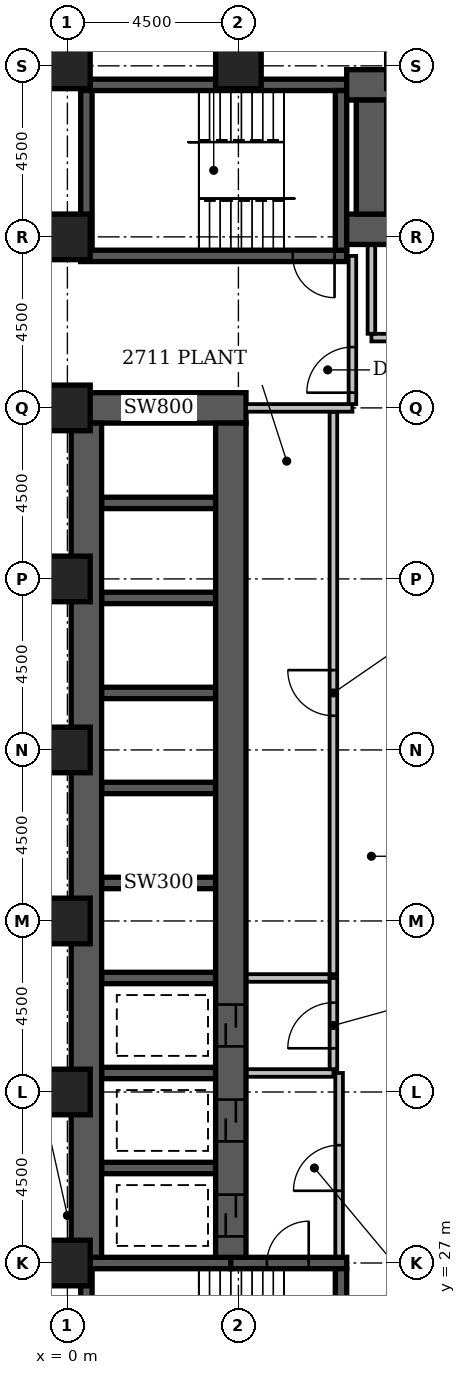
"""IFC4 building model, lengths in metres.
Left out: names, types, materials, properties, quantities, classifications, styles, units other than length and angle.
Written with IfcOpenShell. Run it as: python <this file> out.ifc"""

import sys

from ifc_helpers import new_model, si_unit, direction, frame, frame_2d, origin, origin_2d, place, context, subcontext, project, spatial, rectangle, extrude, element, fill, save


model = new_model("IFC4")
c1 = context("Model", 3, precision=1e-05, world=origin(), true_north=direction((0.0, 1.0)))
c2 = subcontext(c1, "Body", "Model", "MODEL_VIEW")
j1 = project(units=[si_unit("LENGTHUNIT", "METRE"), si_unit("PLANEANGLEUNIT", "RADIAN")], contexts=[c1])
p1 = place(None, origin())
s1 = spatial("IfcSite", under=j1, at=p1, CompositionType="ELEMENT")
p2 = place(p1, origin())
s2 = spatial("IfcBuilding", under=s1, at=p2, CompositionType="ELEMENT")
p3 = place(p2, frame((0.0, 0.0, 108.2)))
s3 = spatial("IfcBuildingStorey", under=s2, at=p3, CompositionType="ELEMENT", Elevation=108.2)
p4 = place(p3, frame((0.1, 49.5, 0.0), z_axis=(0.0, 0.0, 1.0), x_axis=(1.0, 0.0, 0.0)))
e1 = element("IfcWall", 1, at=p4, inside=s3, PredefinedType="SHEAR", context=c2, shape_type="SweptSolid", body=[
    extrude(rectangle(XDim=4.6, YDim=0.8, at=frame_2d((2.3, 0.0))), origin(), (0.0, 0.0, 1.0), 4.9),
])
p5 = place(p3, frame((0.35, 27.0, -0.45), z_axis=(0.0, 0.0, 1.0), x_axis=(1.0, 0.0, 0.0)))
e2 = element("IfcWall", 2, at=p5, inside=s3, PredefinedType="SHEAR", context=c2, shape_type="SweptSolid", body=[
    extrude(rectangle(XDim=3.95, YDim=0.3, at=frame_2d((1.975, 0.0))), origin(), (0.0, 0.0, 1.0), 5.35),
])
p6 = place(p3, frame((0.35, 53.5, -0.45), z_axis=(0.0, 0.0, 1.0), x_axis=(1.0, 0.0, 0.0)))
e3 = element("IfcWall", 3, at=p6, inside=s3, PredefinedType="SHEAR", context=c2, shape_type="SweptSolid", body=[
    extrude(rectangle(XDim=7.0, YDim=0.3, at=frame_2d((3.5, 0.0))), origin(), (0.0, 0.0, 1.0), 5.35),
])
p7 = place(p6, frame((5.58, 0.0, 0.45)))
e4 = element("IfcOpeningElement", 4, at=p7, cuts=e3, PredefinedType="OPENING", context=c2, shape_type="SweptSolid", body=[
    extrude(rectangle(XDim=1.1, YDim=2.1, at=frame_2d((0.55, 1.05))), frame((0.0, 0.162, 0.0), z_axis=(0.0, -1.0, 0.0), x_axis=(1.0, 0.0, 0.0)), (0.0, 0.0, 1.0), 0.324),
])
p8 = place(p3, frame((0.35, 58.0, -0.45), z_axis=(0.0, 0.0, 1.0), x_axis=(1.0, 0.0, 0.0)))
e5 = element("IfcWall", 5, at=p8, inside=s3, PredefinedType="SHEAR", context=c2, shape_type="SweptSolid", body=[
    extrude(rectangle(XDim=7.0, YDim=0.3, at=frame_2d((3.5, 0.0))), origin(), (0.0, 0.0, 1.0), 5.35),
])
p9 = place(p3, frame((0.5, 22.65, -0.45), z_axis=(0.0, 0.0, 1.0), x_axis=(0.0, 1.0, 0.0)))
e6 = element("IfcWall", 6, at=p9, inside=s3, PredefinedType="SHEAR", context=c2, shape_type="SweptSolid", body=[
    extrude(rectangle(XDim=4.2, YDim=0.3, at=frame_2d((2.1, 0.0))), origin(), (0.0, 0.0, 1.0), 5.35),
])
p10 = place(p3, frame((0.5, 27.15, 0.0), z_axis=(0.0, 0.0, 1.0), x_axis=(0.0, 1.0, 0.0)))
e7 = element("IfcWall", 7, at=p10, inside=s3, PredefinedType="SHEAR", context=c2, shape_type="SweptSolid", body=[
    extrude(rectangle(XDim=21.95, YDim=0.8, at=frame_2d((10.975, 0.0))), origin(), (0.0, 0.0, 1.0), 4.9),
])
p11 = place(p3, frame((0.5, 53.65, -0.45), z_axis=(0.0, 0.0, 1.0), x_axis=(0.0, 1.0, 0.0)))
e8 = element("IfcWall", 8, at=p11, inside=s3, PredefinedType="SHEAR", context=c2, shape_type="SweptSolid", body=[
    extrude(rectangle(XDim=4.2, YDim=0.3, at=frame_2d((2.1, 0.0))), origin(), (0.0, 0.0, 1.0), 5.35),
])
for number, where, z_axis, x_axis in (
    (9, (0.9, 29.5, -0.45), (0.0, 0.0, 1.0), (1.0, 0.0, 0.0)),
    (10, (0.9, 32.0, -0.45), (0.0, 0.0, 1.0), (1.0, 0.0, 0.0)),
    (11, (0.9, 34.5, -0.45), (0.0, 0.0, 1.0), (1.0, 0.0, 0.0)),
):
    element("IfcWall", number, at=place(p3, frame(where, z_axis=z_axis, x_axis=x_axis)), inside=s3, PredefinedType="SHEAR", context=c2, shape_type="SweptSolid", body=[
        extrude(rectangle(XDim=3.0, YDim=0.3, at=frame_2d((1.5, 0.0))), origin(), (0.0, 0.0, 1.0), 5.35),
    ])
for number, where, z_axis, x_axis in (
    (12, (0.9, 37.0, 0.0), (0.0, 0.0, 1.0), (1.0, 0.0, 0.0)),
    (13, (0.9, 39.5, 0.0), (0.0, 0.0, 1.0), (1.0, 0.0, 0.0)),
    (14, (0.9, 42.0, 0.0), (0.0, 0.0, 1.0), (1.0, 0.0, 0.0)),
    (15, (0.9, 44.5, 0.0), (0.0, 0.0, 1.0), (1.0, 0.0, 0.0)),
    (16, (0.9, 47.0, 0.0), (0.0, 0.0, 1.0), (1.0, 0.0, 0.0)),
):
    element("IfcWall", number, at=place(p3, frame(where, z_axis=z_axis, x_axis=x_axis)), inside=s3, PredefinedType="SHEAR", context=c2, shape_type="SweptSolid", body=[
        extrude(rectangle(XDim=3.0, YDim=0.3, at=frame_2d((1.5, 0.0))), origin(), (0.0, 0.0, 1.0), 4.9),
    ])
p12 = place(p3, frame((4.3, 27.0, -0.45), z_axis=(0.0, 0.0, 1.0), x_axis=(1.0, 0.0, 0.0)))
e17 = element("IfcWall", 17, at=p12, inside=s3, PredefinedType="SHEAR", context=c2, shape_type="SweptSolid", body=[
    extrude(rectangle(XDim=3.05, YDim=0.3, at=frame_2d((1.525, 0.0))), origin(), (0.0, 0.0, 1.0), 5.35),
])
p13 = place(p12, frame((0.95, 0.0, 0.45)))
e18 = element("IfcOpeningElement", 18, at=p13, cuts=e17, PredefinedType="OPENING", context=c2, shape_type="SweptSolid", body=[
    extrude(rectangle(XDim=1.1, YDim=2.1, at=frame_2d((0.55, 1.05))), frame((0.0, 0.162, 0.0), z_axis=(0.0, -1.0, 0.0), x_axis=(1.0, 0.0, 0.0)), (0.0, 0.0, 1.0), 0.324),
])
p14 = place(p3, frame((4.3, 27.15, 0.0), z_axis=(0.0, 0.0, 1.0), x_axis=(0.0, 1.0, 0.0)))
e19 = element("IfcWall", 19, at=p14, inside=s3, PredefinedType="SHEAR", context=c2, shape_type="SweptSolid", body=[
    extrude(rectangle(XDim=21.95, YDim=0.8, at=frame_2d((10.975, 0.0))), origin(), (0.0, 0.0, 1.0), 4.9),
])
p15 = place(p14, frame((3.05, 0.0, 0.0)))
e20 = element("IfcOpeningElement", 20, at=p15, cuts=e19, PredefinedType="OPENING", context=c2, shape_type="SweptSolid", body=[
    extrude(rectangle(XDim=1.1, YDim=2.1, at=frame_2d((0.55, 1.05))), frame((0.0, 0.412, 0.0), z_axis=(0.0, -1.0, 0.0), x_axis=(1.0, 0.0, 0.0)), (0.0, 0.0, 1.0), 0.824),
])
p16 = place(p14, frame((0.55, 0.0, 0.0)))
e21 = element("IfcOpeningElement", 21, at=p16, cuts=e19, PredefinedType="OPENING", context=c2, shape_type="SweptSolid", body=[
    extrude(rectangle(XDim=1.1, YDim=2.1, at=frame_2d((0.55, 1.05))), frame((0.0, 0.412, 0.0), z_axis=(0.0, -1.0, 0.0), x_axis=(1.0, 0.0, 0.0)), (0.0, 0.0, 1.0), 0.824),
])
p17 = place(p14, frame((5.55, 0.0, 0.0)))
e22 = element("IfcOpeningElement", 22, at=p17, cuts=e19, PredefinedType="OPENING", context=c2, shape_type="SweptSolid", body=[
    extrude(rectangle(XDim=1.1, YDim=2.1, at=frame_2d((0.55, 1.05))), frame((0.0, 0.412, 0.0), z_axis=(0.0, -1.0, 0.0), x_axis=(1.0, 0.0, 0.0)), (0.0, 0.0, 1.0), 0.824),
])
p18 = place(p3, frame((7.2, 22.65, -0.45), z_axis=(0.0, 0.0, 1.0), x_axis=(0.0, 1.0, 0.0)))
e23 = element("IfcWall", 23, at=p18, inside=s3, PredefinedType="SHEAR", context=c2, shape_type="SweptSolid", body=[
    extrude(rectangle(XDim=4.2, YDim=0.3, at=frame_2d((2.1, 0.0))), origin(), (0.0, 0.0, 1.0), 5.35),
])
p19 = place(p18, frame((0.8, 0.0, 0.45)))
e24 = element("IfcOpeningElement", 24, at=p19, cuts=e23, PredefinedType="OPENING", context=c2, shape_type="SweptSolid", body=[
    extrude(rectangle(XDim=1.1, YDim=2.1, at=frame_2d((0.55, 1.05))), frame((0.0, 0.162, 0.0), z_axis=(0.0, -1.0, 0.0), x_axis=(1.0, 0.0, 0.0)), (0.0, 0.0, 1.0), 0.324),
])
p20 = place(p3, frame((7.2, 53.65, -0.45), z_axis=(0.0, 0.0, 1.0), x_axis=(0.0, 1.0, 0.0)))
e25 = element("IfcWall", 25, at=p20, inside=s3, PredefinedType="SHEAR", context=c2, shape_type="SweptSolid", body=[
    extrude(rectangle(XDim=4.2, YDim=0.3, at=frame_2d((2.1, 0.0))), origin(), (0.0, 0.0, 1.0), 5.35),
])
p21 = place(p3, frame((7.35, 54.2, -0.45), z_axis=(0.0, 0.0, 1.0), x_axis=(1.0, 0.0, 0.0)))
e26 = element("IfcWall", 26, at=p21, inside=s3, PredefinedType="SHEAR", context=c2, shape_type="SweptSolid", body=[
    extrude(rectangle(XDim=16.45, YDim=0.8, at=frame_2d((8.225, 0.0))), origin(), (0.0, 0.0, 1.0), 5.35),
])
p22 = place(p21, frame((1.35, 0.0, 0.45)))
e27 = element("IfcOpeningElement", 27, at=p22, cuts=e26, PredefinedType="OPENING", context=c2, shape_type="SweptSolid", body=[
    extrude(rectangle(XDim=1.1, YDim=2.1, at=frame_2d((0.55, 1.05))), frame((0.0, 0.412, 0.0), z_axis=(0.0, -1.0, 0.0), x_axis=(1.0, 0.0, 0.0)), (0.0, 0.0, 1.0), 0.824),
])
p23 = place(p21, frame((3.85, 0.0, 0.45)))
e28 = element("IfcOpeningElement", 28, at=p23, cuts=e26, PredefinedType="OPENING", context=c2, shape_type="SweptSolid", body=[
    extrude(rectangle(XDim=1.1, YDim=2.1, at=frame_2d((0.55, 1.05))), frame((0.0, 0.412, 0.0), z_axis=(0.0, -1.0, 0.0), x_axis=(1.0, 0.0, 0.0)), (0.0, 0.0, 1.0), 0.824),
])
p24 = place(p21, frame((6.35, 0.0, 0.45)))
e29 = element("IfcOpeningElement", 29, at=p24, cuts=e26, PredefinedType="OPENING", context=c2, shape_type="SweptSolid", body=[
    extrude(rectangle(XDim=1.1, YDim=2.1, at=frame_2d((0.55, 1.05))), frame((0.0, 0.412, 0.0), z_axis=(0.0, -1.0, 0.0), x_axis=(1.0, 0.0, 0.0)), (0.0, 0.0, 1.0), 0.824),
])
p25 = place(p21, frame((8.85, 0.0, 0.45)))
e30 = element("IfcOpeningElement", 30, at=p25, cuts=e26, PredefinedType="OPENING", context=c2, shape_type="SweptSolid", body=[
    extrude(rectangle(XDim=1.1, YDim=2.1, at=frame_2d((0.55, 1.05))), frame((0.0, 0.412, 0.0), z_axis=(0.0, -1.0, 0.0), x_axis=(1.0, 0.0, 0.0)), (0.0, 0.0, 1.0), 0.824),
])
p26 = place(p21, frame((11.35, 0.0, 0.45)))
e31 = element("IfcOpeningElement", 31, at=p26, cuts=e26, PredefinedType="OPENING", context=c2, shape_type="SweptSolid", body=[
    extrude(rectangle(XDim=1.1, YDim=2.1, at=frame_2d((0.55, 1.05))), frame((0.0, 0.412, 0.0), z_axis=(0.0, -1.0, 0.0), x_axis=(1.0, 0.0, 0.0)), (0.0, 0.0, 1.0), 0.824),
])
p27 = place(p21, frame((13.85, 0.0, 0.45)))
e32 = element("IfcOpeningElement", 32, at=p27, cuts=e26, PredefinedType="OPENING", context=c2, shape_type="SweptSolid", body=[
    extrude(rectangle(XDim=1.1, YDim=2.1, at=frame_2d((0.55, 1.05))), frame((0.0, 0.412, 0.0), z_axis=(0.0, -1.0, 0.0), x_axis=(1.0, 0.0, 0.0)), (0.0, 0.0, 1.0), 0.824),
])
p28 = place(p3, frame((7.35, 58.0, -0.45), z_axis=(0.0, 0.0, 1.0), x_axis=(1.0, 0.0, 0.0)))
e33 = element("IfcWall", 33, at=p28, inside=s3, PredefinedType="SHEAR", context=c2, shape_type="SweptSolid", body=[
    extrude(rectangle(XDim=16.45, YDim=0.8, at=frame_2d((8.225, 0.0))), origin(), (0.0, 0.0, 1.0), 5.35),
])
p29 = place(p3, frame((8.0, 54.6, -0.45), z_axis=(0.0, 0.0, 1.0), x_axis=(0.0, 1.0, 0.0)))
e34 = element("IfcWall", 34, at=p29, inside=s3, PredefinedType="SHEAR", context=c2, shape_type="SweptSolid", body=[
    extrude(rectangle(XDim=3.0, YDim=0.8, at=frame_2d((1.5, 0.0))), origin(), (0.0, 0.0, 1.0), 5.35),
])
for number, where, z_axis, x_axis in (
    (35, (0.0, 27.0, -0.45), (0.0, 0.0, 1.0), (1.0, 0.0, 0.0)),
    (36, (0.0, 31.5, -0.45), (0.0, 0.0, 1.0), (1.0, 0.0, 0.0)),
    (37, (0.0, 36.0, -0.45), (0.0, 0.0, 1.0), (1.0, 0.0, 0.0)),
    (38, (0.0, 40.5, -0.45), (0.0, 0.0, 1.0), (1.0, 0.0, 0.0)),
    (39, (0.0, 45.0, -0.45), (0.0, 0.0, 1.0), (1.0, 0.0, 0.0)),
    (40, (0.0, 49.5, -0.45), (0.0, 0.0, 1.0), (1.0, 0.0, 0.0)),
    (41, (0.0, 54.0, -0.45), (0.0, 0.0, 1.0), (1.0, 0.0, 0.0)),
    (42, (0.0, 58.5, -0.45), (0.0, 0.0, 1.0), (1.0, 0.0, 0.0)),
    (43, (4.5, 58.5, -0.45), (0.0, 0.0, 1.0), (1.0, 0.0, 0.0)),
):
    element("IfcColumn", number, at=place(p3, frame(where, z_axis=z_axis, x_axis=x_axis)), inside=s3, PredefinedType="COLUMN", context=c2, shape_type="SweptSolid", body=[
        extrude(rectangle(XDim=1.2, YDim=1.2, at=origin_2d()), origin(), (0.0, 0.0, 1.0), 5.35),
    ])
p30 = place(p3, frame((8.0, 51.35, 0.0), z_axis=(0.0, 0.0, 1.0), x_axis=(1.0, 0.0, 0.0)))
e44 = element("IfcWall", 44, at=p30, inside=s3, PredefinedType="PARTITIONING", context=c2, shape_type="SweptSolid", body=[
    extrude(rectangle(XDim=15.0, YDim=0.2, at=frame_2d((7.5, 0.0))), origin(), (0.0, 0.0, 1.0), 4.9),
])
p31 = place(p30, frame((3.4, 0.0, 0.0)))
e45 = element("IfcOpeningElement", 45, at=p31, cuts=e44, PredefinedType="OPENING", context=c2, shape_type="SweptSolid", body=[
    extrude(rectangle(XDim=1.2, YDim=2.1, at=frame_2d((0.6, 1.05))), frame((0.0, 0.112, 0.0), z_axis=(0.0, -1.0, 0.0), x_axis=(1.0, 0.0, 0.0)), (0.0, 0.0, 1.0), 0.224),
])
p32 = place(p30, frame((9.4, 0.0, 0.0)))
e46 = element("IfcOpeningElement", 46, at=p32, cuts=e44, PredefinedType="OPENING", context=c2, shape_type="SweptSolid", body=[
    extrude(rectangle(XDim=1.2, YDim=2.1, at=frame_2d((0.6, 1.05))), frame((0.0, 0.112, 0.0), z_axis=(0.0, -1.0, 0.0), x_axis=(1.0, 0.0, 0.0)), (0.0, 0.0, 1.0), 0.224),
])
p33 = place(p3, frame((8.0, 51.45, 0.0), z_axis=(0.0, 0.0, 1.0), x_axis=(0.0, 1.0, 0.0)))
e47 = element("IfcWall", 47, at=p33, inside=s3, PredefinedType="PARTITIONING", context=c2, shape_type="SweptSolid", body=[
    extrude(rectangle(XDim=2.33, YDim=0.2, at=frame_2d((1.165, 0.0))), origin(), (0.0, 0.0, 1.0), 4.9),
])
p34 = place(p3, frame((4.72, 32.0, 0.0), z_axis=(0.0, 0.0, 1.0), x_axis=(1.0, 0.0, 0.0)))
e48 = element("IfcWall", 48, at=p34, inside=s3, PredefinedType="PARTITIONING", context=c2, shape_type="SweptSolid", body=[
    extrude(rectangle(XDim=2.28, YDim=0.2, at=frame_2d((1.14, 0.0))), origin(), (0.0, 0.0, 1.0), 4.9),
])
p35 = place(p3, frame((7.0, 32.1, 0.0), z_axis=(0.0, 0.0, 1.0), x_axis=(0.0, 1.0, 0.0)))
e49 = element("IfcWall", 49, at=p35, inside=s3, PredefinedType="PARTITIONING", context=c2, shape_type="SweptSolid", body=[
    extrude(rectangle(XDim=2.4, YDim=0.2, at=frame_2d((1.2, 0.0))), origin(), (0.0, 0.0, 1.0), 4.9),
])
p36 = place(p35, frame((0.55, 0.0, 0.0)))
e50 = element("IfcOpeningElement", 50, at=p36, cuts=e49, PredefinedType="OPENING", context=c2, shape_type="SweptSolid", body=[
    extrude(rectangle(XDim=1.2, YDim=2.1, at=frame_2d((0.6, 1.05))), frame((0.0, 0.112, 0.0), z_axis=(0.0, -1.0, 0.0), x_axis=(1.0, 0.0, 0.0)), (0.0, 0.0, 1.0), 0.224),
])
p37 = place(p3, frame((4.72, 34.5, 0.0), z_axis=(0.0, 0.0, 1.0), x_axis=(1.0, 0.0, 0.0)))
e51 = element("IfcWall", 51, at=p37, inside=s3, PredefinedType="PARTITIONING", context=c2, shape_type="SweptSolid", body=[
    extrude(rectangle(XDim=2.18, YDim=0.2, at=frame_2d((1.09, 0.0))), origin(), (0.0, 0.0, 1.0), 4.9),
])
p38 = place(p3, frame((7.15, 27.17, 0.0), z_axis=(0.0, 0.0, 1.0), x_axis=(0.0, 1.0, 0.0)))
e52 = element("IfcWall", 52, at=p38, inside=s3, PredefinedType="PARTITIONING", context=c2, shape_type="SweptSolid", body=[
    extrude(rectangle(XDim=4.83, YDim=0.2, at=frame_2d((2.415, 0.0))), origin(), (0.0, 0.0, 1.0), 4.9),
])
p39 = place(p38, frame((1.73, 0.0, 0.0)))
e53 = element("IfcOpeningElement", 53, at=p39, cuts=e52, PredefinedType="OPENING", context=c2, shape_type="SweptSolid", body=[
    extrude(rectangle(XDim=1.2, YDim=2.1, at=frame_2d((0.6, 1.05))), frame((0.0, 0.112, 0.0), z_axis=(0.0, -1.0, 0.0), x_axis=(1.0, 0.0, 0.0)), (0.0, 0.0, 1.0), 0.224),
])
p40 = place(p3, frame((4.7, 49.5, 0.0), z_axis=(0.0, 0.0, 1.0), x_axis=(1.0, 0.0, 0.0)))
e54 = element("IfcWall", 54, at=p40, inside=s3, PredefinedType="PARTITIONING", context=c2, shape_type="SweptSolid", body=[
    extrude(rectangle(XDim=2.8, YDim=0.2, at=frame_2d((1.4, 0.0))), origin(), (0.0, 0.0, 1.0), 4.9),
])
p41 = place(p3, frame((7.5, 49.6, 0.0), z_axis=(0.0, 0.0, 1.0), x_axis=(0.0, 1.0, 0.0)))
e55 = element("IfcWall", 55, at=p41, inside=s3, PredefinedType="PARTITIONING", context=c2, shape_type="SweptSolid", body=[
    extrude(rectangle(XDim=3.9, YDim=0.2, at=frame_2d((1.95, 0.0))), origin(), (0.0, 0.0, 1.0), 4.9),
])
p42 = place(p41, frame((0.3, 0.0, 0.0)))
e56 = element("IfcOpeningElement", 56, at=p42, cuts=e55, PredefinedType="OPENING", context=c2, shape_type="SweptSolid", body=[
    extrude(rectangle(XDim=1.2, YDim=2.1, at=frame_2d((0.6, 1.05))), frame((0.0, 0.112, 0.0), z_axis=(0.0, -1.0, 0.0), x_axis=(1.0, 0.0, 0.0)), (0.0, 0.0, 1.0), 0.224),
])
p43 = place(p3, frame((7.0, 49.4, 0.0), z_axis=(0.0, 0.0, 1.0), x_axis=(0.0, -1.0, 0.0)))
e57 = element("IfcWall", 57, at=p43, inside=s3, PredefinedType="PARTITIONING", context=c2, shape_type="SweptSolid", body=[
    extrude(rectangle(XDim=14.8, YDim=0.2, at=frame_2d((7.4, 0.0))), origin(), (0.0, 0.0, 1.0), 4.9),
])
p44 = place(p43, frame((6.8, 0.0, 0.0)))
e58 = element("IfcOpeningElement", 58, at=p44, cuts=e57, PredefinedType="OPENING", context=c2, shape_type="SweptSolid", body=[
    extrude(rectangle(XDim=1.2, YDim=2.1, at=frame_2d((0.6, 1.05))), frame((0.0, 0.112, 0.0), z_axis=(0.0, -1.0, 0.0), x_axis=(1.0, 0.0, 0.0)), (0.0, 0.0, 1.0), 0.224),
])
p45 = place(p42, origin())
e59 = element("IfcDoor", 59, at=p45, inside=s3, OperationType="SINGLE_SWING_LEFT", PredefinedType="DOOR", context=c2, shape_type="SweptSolid", body=[
    extrude(rectangle(XDim=1.2, YDim=2.1, at=frame_2d((0.6, 1.05))), frame((0.0, 0.025, 0.0), z_axis=(0.0, -1.0, 0.0), x_axis=(1.0, 0.0, 0.0)), (0.0, 0.0, 1.0), 0.05),
])
fill(e56, e59)
p46 = place(p39, origin())
e60 = element("IfcDoor", 60, at=p46, inside=s3, OperationType="SINGLE_SWING_LEFT", PredefinedType="DOOR", context=c2, shape_type="SweptSolid", body=[
    extrude(rectangle(XDim=1.2, YDim=2.1, at=frame_2d((0.6, 1.05))), frame((0.0, 0.025, 0.0), z_axis=(0.0, -1.0, 0.0), x_axis=(1.0, 0.0, 0.0)), (0.0, 0.0, 1.0), 0.05),
])
fill(e53, e60)
p47 = place(p15, origin())
e61 = element("IfcDoor", 61, at=p47, inside=s3, OperationType="SLIDING_TO_LEFT", PredefinedType="DOOR", context=c2, shape_type="SweptSolid", body=[
    extrude(rectangle(XDim=1.1, YDim=2.1, at=frame_2d((0.55, 1.05))), frame((0.0, 0.025, 0.0), z_axis=(0.0, -1.0, 0.0), x_axis=(1.0, 0.0, 0.0)), (0.0, 0.0, 1.0), 0.05),
])
fill(e20, e61)
p48 = place(p16, origin())
e62 = element("IfcDoor", 62, at=p48, inside=s3, OperationType="SLIDING_TO_LEFT", PredefinedType="DOOR", context=c2, shape_type="SweptSolid", body=[
    extrude(rectangle(XDim=1.1, YDim=2.1, at=frame_2d((0.55, 1.05))), frame((0.0, 0.025, 0.0), z_axis=(0.0, -1.0, 0.0), x_axis=(1.0, 0.0, 0.0)), (0.0, 0.0, 1.0), 0.05),
])
fill(e21, e62)
p49 = place(p36, origin())
e63 = element("IfcDoor", 63, at=p49, inside=s3, OperationType="SINGLE_SWING_LEFT", PredefinedType="DOOR", context=c2, shape_type="SweptSolid", body=[
    extrude(rectangle(XDim=1.2, YDim=2.1, at=frame_2d((0.6, 1.05))), frame((0.0, 0.025, 0.0), z_axis=(0.0, -1.0, 0.0), x_axis=(1.0, 0.0, 0.0)), (0.0, 0.0, 1.0), 0.05),
])
fill(e50, e63)
p50 = place(p17, origin())
e64 = element("IfcDoor", 64, at=p50, inside=s3, OperationType="SLIDING_TO_LEFT", PredefinedType="DOOR", context=c2, shape_type="SweptSolid", body=[
    extrude(rectangle(XDim=1.1, YDim=2.1, at=frame_2d((0.55, 1.05))), frame((0.0, 0.025, 0.0), z_axis=(0.0, -1.0, 0.0), x_axis=(1.0, 0.0, 0.0)), (0.0, 0.0, 1.0), 0.05),
])
fill(e22, e64)
p51 = place(p13, frame((1.1, 0.0, 0.0), z_axis=(0.0, 0.0, 1.0), x_axis=(-1.0, 0.0, 0.0)))
e65 = element("IfcDoor", 65, at=p51, inside=s3, OperationType="SINGLE_SWING_LEFT", PredefinedType="DOOR", context=c2, shape_type="SweptSolid", body=[
    extrude(rectangle(XDim=1.1, YDim=2.1, at=frame_2d((0.55, 1.05))), frame((0.0, 0.025, 0.0), z_axis=(0.0, -1.0, 0.0), x_axis=(1.0, 0.0, 0.0)), (0.0, 0.0, 1.0), 0.05),
])
fill(e18, e65)
p52 = place(p7, origin())
e66 = element("IfcDoor", 66, at=p52, inside=s3, OperationType="SINGLE_SWING_RIGHT", PredefinedType="DOOR", context=c2, shape_type="SweptSolid", body=[
    extrude(rectangle(XDim=1.1, YDim=2.1, at=frame_2d((0.55, 1.05))), frame((0.0, 0.025, 0.0), z_axis=(0.0, -1.0, 0.0), x_axis=(1.0, 0.0, 0.0)), (0.0, 0.0, 1.0), 0.05),
])
fill(e4, e66)
p53 = place(p44, frame((1.2, 0.0, 0.0), z_axis=(0.0, 0.0, 1.0), x_axis=(-1.0, 0.0, 0.0)))
e67 = element("IfcDoor", 67, at=p53, inside=s3, OperationType="SINGLE_SWING_RIGHT", PredefinedType="DOOR", context=c2, shape_type="SweptSolid", body=[
    extrude(rectangle(XDim=1.2, YDim=2.1, at=frame_2d((0.6, 1.05))), frame((0.0, 0.025, 0.0), z_axis=(0.0, -1.0, 0.0), x_axis=(1.0, 0.0, 0.0)), (0.0, 0.0, 1.0), 0.05),
])
fill(e58, e67)
save(model, sys.argv[1])
